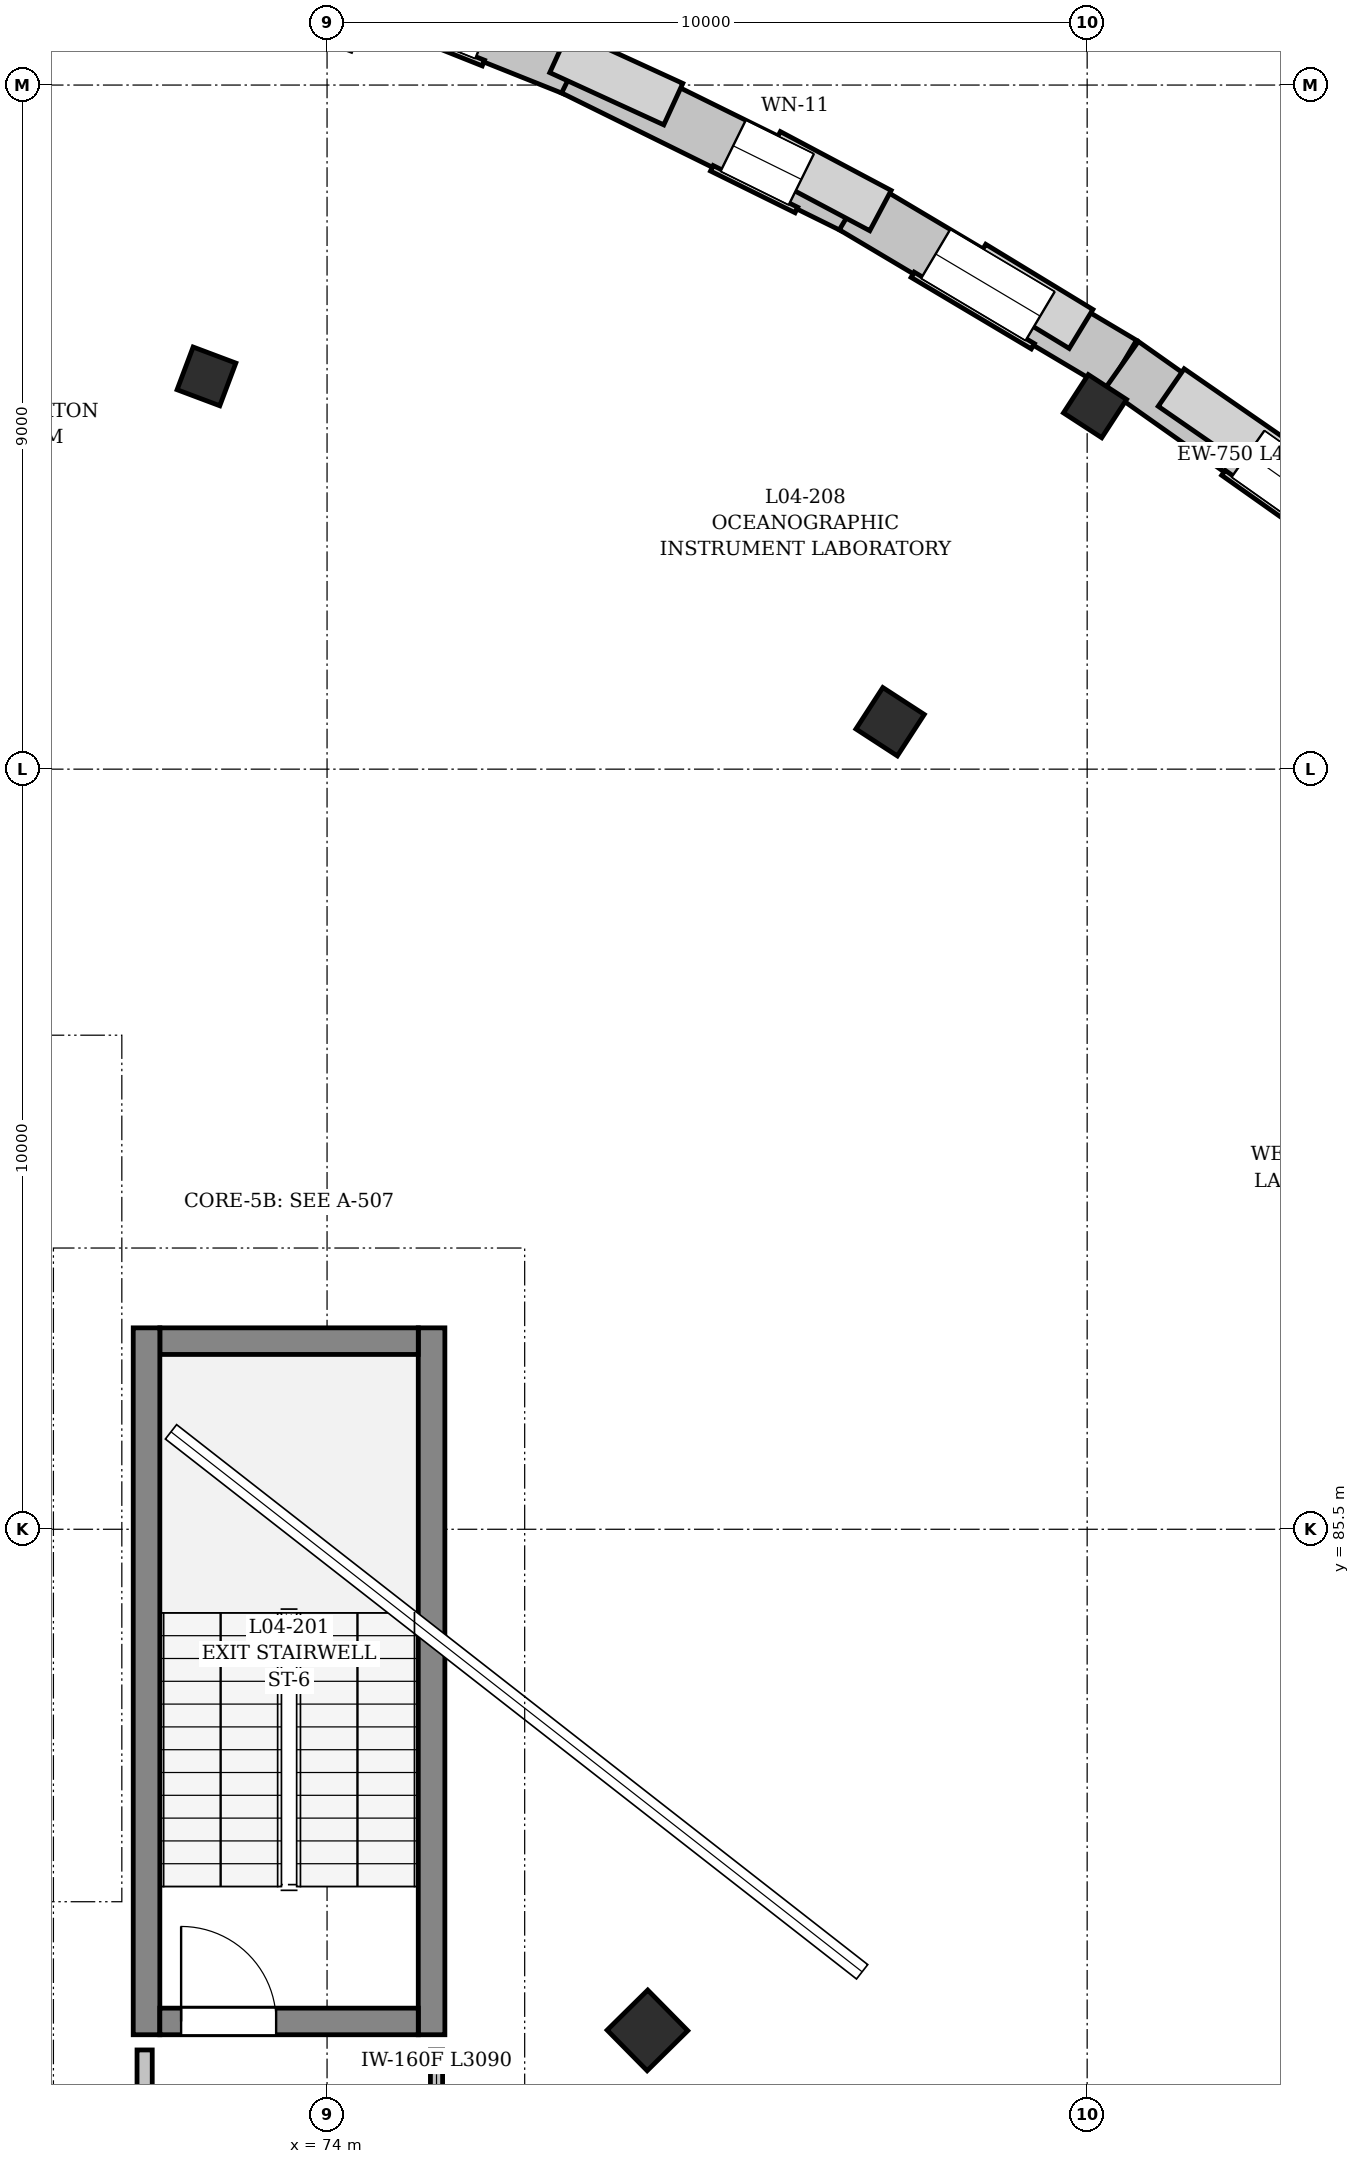
"""IFC4 building model, lengths in metres.
Left out: names, types, materials, properties, quantities, classifications, styles, units other than length and angle.
Written with IfcOpenShell. Run it as: python <this file> out.ifc"""

import sys

from ifc_helpers import new_model, si_unit, direction, frame, frame_2d, origin, origin_2d, place, context, subcontext, project, spatial, rectangle, extrude, element, fill, save


model = new_model("IFC4")
c1 = context("Model", 3, precision=1e-05, world=origin(), true_north=direction((0.0, 1.0)))
c2 = subcontext(c1, "Body", "Model", "MODEL_VIEW")
j1 = project(units=[si_unit("LENGTHUNIT", "METRE"), si_unit("PLANEANGLEUNIT", "RADIAN")], contexts=[c1])
p1 = place(None, origin())
s1 = spatial("IfcSite", under=j1, at=p1, CompositionType="ELEMENT")
p2 = place(p1, origin())
s2 = spatial("IfcBuilding", under=s1, at=p2, CompositionType="ELEMENT")
p3 = place(p2, frame((0.0, 0.0, 15.0)))
s3 = spatial("IfcBuildingStorey", under=s2, at=p3, CompositionType="ELEMENT", Elevation=15.0)
p4 = place(p3, frame((78.215, 78.907, 0.0), z_axis=(0.0, 0.0, 1.0), x_axis=(0.712026045991, 0.702153052995, 0.0)))
e1 = element("IfcColumn", 1, at=p4, inside=s3, PredefinedType="COLUMN", context=c2, shape_type="SweptSolid", body=[
    extrude(rectangle(XDim=0.75, YDim=0.75, at=origin_2d()), origin(), (0.0, 0.0, 1.0), 4.52),
])
p5 = place(p3, frame((81.407, 96.124, 0.0), z_axis=(0.0, 0.0, 1.0), x_axis=(0.544639035015, 0.838670567945, 0.0)))
e2 = element("IfcColumn", 2, at=p5, inside=s3, PredefinedType="COLUMN", context=c2, shape_type="SweptSolid", body=[
    extrude(rectangle(XDim=0.65, YDim=0.65, at=origin_2d()), origin(), (0.0, 0.0, 1.0), 4.52),
])
for number, where, z_axis, x_axis in (
    (3, (84.104, 100.275, 0.0), (0.0, 0.0, 1.0), (0.545, 0.839, 0.0)),
    (4, (72.413, 100.667, 0.0), (0.0, 0.0, 1.0), (0.352, 0.936, 0.0)),
):
    element("IfcColumn", number, at=place(p3, frame(where, z_axis=z_axis, x_axis=x_axis)), inside=s3, PredefinedType="COLUMN", context=c2, shape_type="SweptSolid", body=[
        extrude(rectangle(XDim=0.6, YDim=0.6, at=origin_2d()), origin(), (0.0, 0.0, 1.0), 4.52),
    ])
p6 = place(p3, frame((73.441, 106.253, 0.0), z_axis=(0.0, 0.0, 1.0), x_axis=(0.928788263231, -0.370610795964, 0.0)))
e5 = element("IfcWall", 5, at=p6, inside=s3, PredefinedType="SOLIDWALL", context=c2, shape_type="SweptSolid", body=[
    extrude(rectangle(XDim=4.103, YDim=0.75, at=frame_2d((2.051, 0.0))), origin(), (0.0, 0.0, 1.0), 3.11),
])
p7 = place(p6, frame((1.251, 0.0, 0.75)))
e6 = element("IfcOpeningElement", 6, at=p7, cuts=e5, PredefinedType="OPENING", context=c2, shape_type="SweptSolid", body=[
    extrude(rectangle(XDim=1.6, YDim=1.6, at=frame_2d((0.8, 0.8))), frame((0.0, 0.385, 0.0), z_axis=(0.0, -1.0, 0.0), x_axis=(1.0, 0.0, 0.0)), (0.0, 0.0, 1.0), 0.77),
])
p8 = place(p3, frame((77.252, 104.732, 0.0), z_axis=(0.0, 0.0, 1.0), x_axis=(0.896877337999, -0.442279369385, 0.0)))
e7 = element("IfcWall", 7, at=p8, inside=s3, PredefinedType="SOLIDWALL", context=c2, shape_type="SweptSolid", body=[
    extrude(rectangle(XDim=4.103, YDim=0.75, at=frame_2d((2.051, 0.0))), origin(), (0.0, 0.0, 1.0), 4.52),
])
p9 = place(p8, frame((2.331, 0.0, 0.75)))
e8 = element("IfcOpeningElement", 8, at=p9, cuts=e7, PredefinedType="OPENING", context=c2, shape_type="SweptSolid", body=[
    extrude(rectangle(XDim=1.0, YDim=2.3, at=frame_2d((0.5, 1.15))), frame((0.0, 0.385, 0.0), z_axis=(0.0, -1.0, 0.0), x_axis=(1.0, 0.0, 0.0)), (0.0, 0.0, 1.0), 0.77),
])
p10 = place(p3, frame((80.931, 102.918, 0.0), z_axis=(0.0, 0.0, 1.0), x_axis=(0.859408689216, -0.511289257564, 0.0)))
e9 = element("IfcWall", 9, at=p10, inside=s3, PredefinedType="SOLIDWALL", context=c2, shape_type="SweptSolid", body=[
    extrude(rectangle(XDim=4.103, YDim=0.75, at=frame_2d((2.051, 0.0))), origin(), (0.0, 0.0, 1.0), 3.11),
])
p11 = place(p10, frame((1.251, 0.0, 0.75)))
e10 = element("IfcOpeningElement", 10, at=p11, cuts=e9, PredefinedType="OPENING", context=c2, shape_type="SweptSolid", body=[
    extrude(rectangle(XDim=1.6, YDim=1.6, at=frame_2d((0.8, 0.8))), frame((0.0, 0.385, 0.0), z_axis=(0.0, -1.0, 0.0), x_axis=(1.0, 0.0, 0.0)), (0.0, 0.0, 1.0), 0.77),
])
p12 = place(p3, frame((84.457, 100.82, 0.0), z_axis=(0.0, 0.0, 1.0), x_axis=(0.816654387976, -0.577127031596, 0.0)))
e11 = element("IfcWall", 11, at=p12, inside=s3, PredefinedType="SOLIDWALL", context=c2, shape_type="SweptSolid", body=[
    extrude(rectangle(XDim=4.103, YDim=0.75, at=frame_2d((2.051, 0.0))), origin(), (0.0, 0.0, 1.0), 3.11),
])
p13 = place(p12, frame((2.031, 0.0, 0.75)))
e12 = element("IfcOpeningElement", 12, at=p13, cuts=e11, PredefinedType="OPENING", context=c2, shape_type="SweptSolid", body=[
    extrude(rectangle(XDim=1.6, YDim=1.6, at=frame_2d((0.8, 0.8))), frame((0.0, 0.385, 0.0), z_axis=(0.0, -1.0, 0.0), x_axis=(1.0, 0.0, 0.0)), (0.0, 0.0, 1.0), 0.77),
])
p14 = place(p3, frame((92.574, 78.531, 0.0), z_axis=(0.0, 0.0, 1.0), x_axis=(-0.866024649003, -0.500001307318, 0.0)))
e13 = element("IfcWall", 13, at=p14, inside=s3, PredefinedType="SOLIDWALL", context=c2, shape_type="SweptSolid", body=[
    extrude(rectangle(XDim=11.823, YDim=0.52, at=frame_2d((5.911, 0.0))), origin(), (0.0, 0.0, 1.0), 4.52),
])
p15 = place(p14, frame((2.911, 0.0, 0.9)))
e14 = element("IfcOpeningElement", 14, at=p15, cuts=e13, PredefinedType="OPENING", context=c2, shape_type="SweptSolid", body=[
    extrude(rectangle(XDim=2.2, YDim=1.8, at=frame_2d((1.1, 0.9))), frame((0.0, 0.27, 0.0), z_axis=(0.0, -1.0, 0.0), x_axis=(1.0, 0.0, 0.0)), (0.0, 0.0, 1.0), 0.54),
])
p16 = place(p14, frame((6.711, 0.0, 0.9)))
e15 = element("IfcOpeningElement", 15, at=p16, cuts=e13, PredefinedType="OPENING", context=c2, shape_type="SweptSolid", body=[
    extrude(rectangle(XDim=2.2, YDim=1.8, at=frame_2d((1.1, 0.9))), frame((0.0, 0.27, 0.0), z_axis=(0.0, -1.0, 0.0), x_axis=(1.0, 0.0, 0.0)), (0.0, 0.0, 1.0), 0.54),
])
p17 = place(p3, frame((75.375, 78.85, 0.0), z_axis=(0.0, 0.0, 1.0), x_axis=(0.0, 1.0, 0.0)))
e16 = element("IfcWall", 16, at=p17, inside=s3, PredefinedType="SHEAR", context=c2, shape_type="SweptSolid", body=[
    extrude(rectangle(XDim=9.3, YDim=0.35, at=frame_2d((4.65, 0.0))), origin(), (0.0, 0.0, 1.0), 4.52),
])
p18 = place(p3, frame((75.2, 87.975, 0.0), z_axis=(0.0, 0.0, 1.0), x_axis=(-1.0, 0.0, 0.0)))
e17 = element("IfcWall", 17, at=p18, inside=s3, PredefinedType="SHEAR", context=c2, shape_type="SweptSolid", body=[
    extrude(rectangle(XDim=3.4, YDim=0.35, at=frame_2d((1.7, 0.0))), origin(), (0.0, 0.0, 1.0), 4.52),
])
p19 = place(p3, frame((71.625, 88.15, 0.0), z_axis=(0.0, 0.0, 1.0), x_axis=(0.0, -1.0, 0.0)))
e18 = element("IfcWall", 18, at=p19, inside=s3, PredefinedType="SHEAR", context=c2, shape_type="SweptSolid", body=[
    extrude(rectangle(XDim=9.3, YDim=0.35, at=frame_2d((4.65, 0.0))), origin(), (0.0, 0.0, 1.0), 4.52),
])
p20 = place(p3, frame((71.8, 79.025, 0.0), z_axis=(0.0, 0.0, 1.0), x_axis=(1.0, 0.0, 0.0)))
e19 = element("IfcWall", 19, at=p20, inside=s3, PredefinedType="SHEAR", context=c2, shape_type="SweptSolid", body=[
    extrude(rectangle(XDim=3.4, YDim=0.35, at=frame_2d((1.7, 0.0))), origin(), (0.0, 0.0, 1.0), 4.52),
])
p21 = place(p20, frame((0.28, 0.0, 0.0)))
e20 = element("IfcOpeningElement", 20, at=p21, cuts=e19, PredefinedType="OPENING", context=c2, shape_type="SweptSolid", body=[
    extrude(rectangle(XDim=1.25, YDim=2.2, at=frame_2d((0.625, 1.1))), frame((0.0, 0.185, 0.0), z_axis=(0.0, -1.0, 0.0), x_axis=(1.0, 0.0, 0.0)), (0.0, 0.0, 1.0), 0.37),
])
p22 = place(p3, frame((71.6, 78.65, 0.0), z_axis=(0.0, 0.0, 1.0), x_axis=(0.0, -1.0, 0.0)))
e21 = element("IfcWall", 21, at=p22, inside=s3, PredefinedType="PARTITIONING", context=c2, shape_type="SweptSolid", body=[
    extrude(rectangle(XDim=3.05, YDim=0.2, at=frame_2d((1.525, 0.0))), origin(), (0.0, 0.0, 1.0), 4.52),
])
p23 = place(p22, frame((0.9, 0.0, 0.0)))
e22 = element("IfcOpeningElement", 22, at=p23, cuts=e21, PredefinedType="OPENING", context=c2, shape_type="SweptSolid", body=[
    extrude(rectangle(XDim=1.25, YDim=2.2, at=frame_2d((0.625, 1.1))), frame((0.0, 0.11, 0.0), z_axis=(0.0, -1.0, 0.0), x_axis=(1.0, 0.0, 0.0)), (0.0, 0.0, 1.0), 0.22),
])
p24 = place(p3, frame((75.44, 78.65, 0.0), z_axis=(0.0, 0.0, 1.0), x_axis=(0.0, -1.0, 0.0)))
e23 = element("IfcWall", 23, at=p24, inside=s3, PredefinedType="PARTITIONING", context=c2, shape_type="SweptSolid", body=[
    extrude(rectangle(XDim=3.09, YDim=0.16, at=frame_2d((1.545, 0.0))), origin(), (0.0, 0.0, 1.0), 3.61),
])
p25 = place(p24, frame((0.995, 0.0, 0.0)))
e24 = element("IfcOpeningElement", 24, at=p25, cuts=e23, PredefinedType="OPENING", context=c2, shape_type="SweptSolid", body=[
    extrude(rectangle(XDim=1.1, YDim=2.2, at=frame_2d((0.55, 1.1))), frame((0.0, 0.09, 0.0), z_axis=(0.0, -1.0, 0.0), x_axis=(1.0, 0.0, 0.0)), (0.0, 0.0, 1.0), 0.18),
])
p26 = place(p9, origin())
e25 = element("IfcWindow", 25, at=p26, inside=s3, PartitioningType="SINGLE_PANEL", PredefinedType="WINDOW", context=c2, shape_type="SweptSolid", body=[
    extrude(rectangle(XDim=1.0, YDim=2.3, at=frame_2d((0.5, 1.15))), frame((0.0, 0.03, 0.0), z_axis=(0.0, -1.0, 0.0), x_axis=(1.0, 0.0, 0.0)), (0.0, 0.0, 1.0), 0.06),
])
fill(e8, e25)
p27 = place(p11, origin())
e26 = element("IfcWindow", 26, at=p27, inside=s3, PartitioningType="DOUBLE_PANEL_VERTICAL", PredefinedType="WINDOW", context=c2, shape_type="SweptSolid", body=[
    extrude(rectangle(XDim=1.6, YDim=1.6, at=frame_2d((0.8, 0.8))), frame((0.0, 0.03, 0.0), z_axis=(0.0, -1.0, 0.0), x_axis=(1.0, 0.0, 0.0)), (0.0, 0.0, 1.0), 0.06),
])
fill(e10, e26)
p28 = place(p13, origin())
e27 = element("IfcWindow", 27, at=p28, inside=s3, PartitioningType="DOUBLE_PANEL_VERTICAL", PredefinedType="WINDOW", context=c2, shape_type="SweptSolid", body=[
    extrude(rectangle(XDim=1.6, YDim=1.6, at=frame_2d((0.8, 0.8))), frame((0.0, 0.03, 0.0), z_axis=(0.0, -1.0, 0.0), x_axis=(1.0, 0.0, 0.0)), (0.0, 0.0, 1.0), 0.06),
])
fill(e12, e27)
p29 = place(p21, origin())
e28 = element("IfcDoor", 28, at=p29, inside=s3, OperationType="SINGLE_SWING_LEFT", PredefinedType="DOOR", context=c2, shape_type="SweptSolid", body=[
    extrude(rectangle(XDim=1.25, YDim=2.2, at=frame_2d((0.625, 1.1))), frame((0.0, 0.025, 0.0), z_axis=(0.0, -1.0, 0.0), x_axis=(1.0, 0.0, 0.0)), (0.0, 0.0, 1.0), 0.05),
])
fill(e20, e28)
save(model, sys.argv[1])
